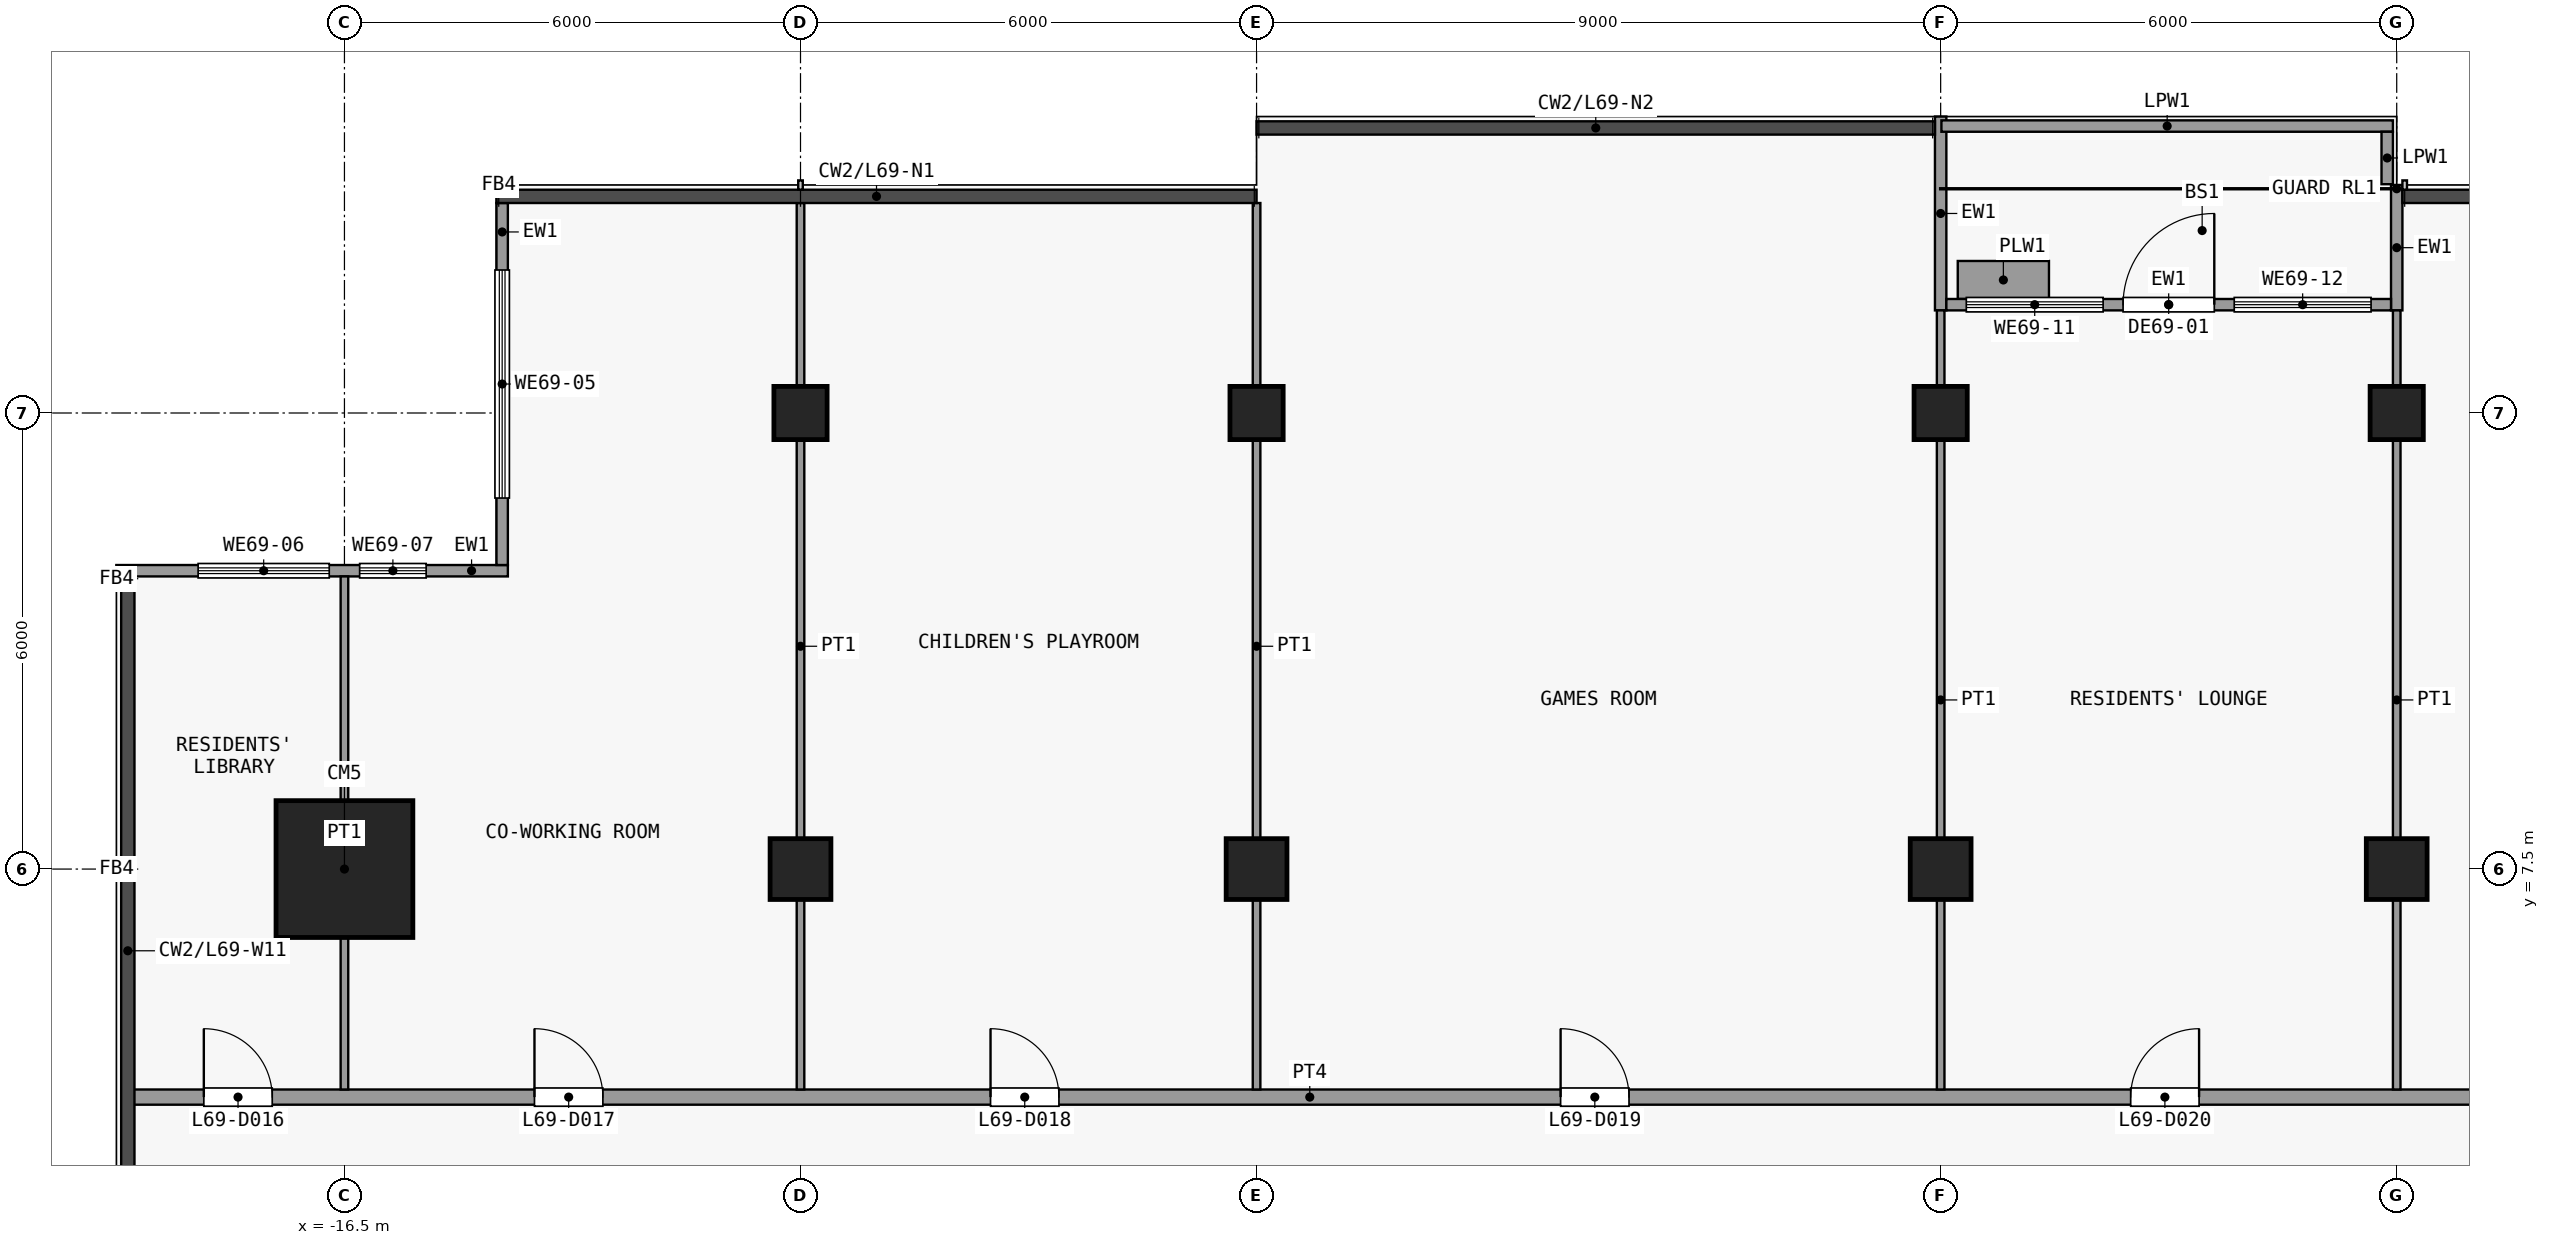
"""IFC4 building model, lengths in metres.
Left out: names, types, materials, properties, quantities, classifications, styles, units other than length and angle.
Written with IfcOpenShell. Run it as: python <this file> out.ifc"""

import sys

from ifc_helpers import new_model, si_unit, direction, frame, frame_2d, origin, origin_2d, place, context, subcontext, project, spatial, rectangle, extrude, element, fill, save


model = new_model("IFC4")
c1 = context("Model", 3, precision=1e-05, world=origin(), true_north=direction((0.0, 1.0)))
c2 = subcontext(c1, "Body", "Model", "MODEL_VIEW")
j1 = project(units=[si_unit("LENGTHUNIT", "METRE"), si_unit("PLANEANGLEUNIT", "RADIAN")], contexts=[c1])
p1 = place(None, origin())
s1 = spatial("IfcSite", under=j1, at=p1, CompositionType="ELEMENT")
p2 = place(p1, origin())
s2 = spatial("IfcBuilding", under=s1, at=p2, CompositionType="ELEMENT")
p3 = place(p2, frame((0.0, 0.0, 273.5)))
s3 = spatial("IfcBuildingStorey", under=s2, at=p3, CompositionType="ELEMENT", Elevation=273.5)
p4 = place(p3, frame((-16.5, 7.5, 0.0), z_axis=(0.0, 0.0, 1.0), x_axis=(1.0, 0.0, 0.0)))
e1 = element("IfcColumn", 1, at=p4, inside=s3, PredefinedType="COLUMN", context=c2, shape_type="SweptSolid", body=[
    extrude(rectangle(XDim=1.8, YDim=1.8, at=origin_2d()), origin(), (0.0, 0.0, 1.0), 3.6),
])
p5 = place(p3, frame((-10.5, 7.5, 0.0), z_axis=(0.0, 0.0, 1.0), x_axis=(1.0, 0.0, 0.0)))
e2 = element("IfcColumn", 2, at=p5, inside=s3, PredefinedType="COLUMN", context=c2, shape_type="SweptSolid", body=[
    extrude(rectangle(XDim=0.8, YDim=0.8, at=origin_2d()), origin(), (0.0, 0.0, 1.0), 3.6),
])
p6 = place(p3, frame((-10.5, 13.5, 0.0), z_axis=(0.0, 0.0, 1.0), x_axis=(1.0, 0.0, 0.0)))
e3 = element("IfcColumn", 3, at=p6, inside=s3, PredefinedType="COLUMN", context=c2, shape_type="SweptSolid", body=[
    extrude(rectangle(XDim=0.7, YDim=0.7, at=origin_2d()), origin(), (0.0, 0.0, 1.0), 3.6),
])
p7 = place(p3, frame((-4.5, 7.5, 0.0), z_axis=(0.0, 0.0, 1.0), x_axis=(1.0, 0.0, 0.0)))
e4 = element("IfcColumn", 4, at=p7, inside=s3, PredefinedType="COLUMN", context=c2, shape_type="SweptSolid", body=[
    extrude(rectangle(XDim=0.8, YDim=0.8, at=origin_2d()), origin(), (0.0, 0.0, 1.0), 3.6),
])
p8 = place(p3, frame((-4.5, 13.5, 0.0), z_axis=(0.0, 0.0, 1.0), x_axis=(1.0, 0.0, 0.0)))
e5 = element("IfcColumn", 5, at=p8, inside=s3, PredefinedType="COLUMN", context=c2, shape_type="SweptSolid", body=[
    extrude(rectangle(XDim=0.7, YDim=0.7, at=origin_2d()), origin(), (0.0, 0.0, 1.0), 3.6),
])
p9 = place(p3, frame((4.5, 7.5, 0.0), z_axis=(0.0, 0.0, 1.0), x_axis=(1.0, 0.0, 0.0)))
e6 = element("IfcColumn", 6, at=p9, inside=s3, PredefinedType="COLUMN", context=c2, shape_type="SweptSolid", body=[
    extrude(rectangle(XDim=0.8, YDim=0.8, at=origin_2d()), origin(), (0.0, 0.0, 1.0), 3.6),
])
p10 = place(p3, frame((4.5, 13.5, 0.0), z_axis=(0.0, 0.0, 1.0), x_axis=(1.0, 0.0, 0.0)))
e7 = element("IfcColumn", 7, at=p10, inside=s3, PredefinedType="COLUMN", context=c2, shape_type="SweptSolid", body=[
    extrude(rectangle(XDim=0.7, YDim=0.7, at=origin_2d()), origin(), (0.0, 0.0, 1.0), 3.6),
])
p11 = place(p3, frame((10.5, 7.5, 0.0), z_axis=(0.0, 0.0, 1.0), x_axis=(1.0, 0.0, 0.0)))
e8 = element("IfcColumn", 8, at=p11, inside=s3, PredefinedType="COLUMN", context=c2, shape_type="SweptSolid", body=[
    extrude(rectangle(XDim=0.8, YDim=0.8, at=origin_2d()), origin(), (0.0, 0.0, 1.0), 3.6),
])
p12 = place(p3, frame((10.5, 13.5, 0.0), z_axis=(0.0, 0.0, 1.0), x_axis=(1.0, 0.0, 0.0)))
e9 = element("IfcColumn", 9, at=p12, inside=s3, PredefinedType="COLUMN", context=c2, shape_type="SweptSolid", body=[
    extrude(rectangle(XDim=0.7, YDim=0.7, at=origin_2d()), origin(), (0.0, 0.0, 1.0), 3.6),
])
p13 = place(p3, frame((-14.425, 11.5, 0.0), z_axis=(0.0, 0.0, 1.0), x_axis=(0.0, 1.0, 0.0)))
e10 = element("IfcWall", 10, at=p13, inside=s3, PredefinedType="SOLIDWALL", context=c2, shape_type="SweptSolid", body=[
    extrude(rectangle(XDim=4.762, YDim=0.15, at=frame_2d((2.381, 0.0))), origin(), (0.0, 0.0, 1.0), 3.3),
])
p14 = place(p13, frame((0.881, 0.0, 0.9)))
e11 = element("IfcOpeningElement", 11, at=p14, cuts=e10, PredefinedType="OPENING", context=c2, shape_type="SweptSolid", body=[
    extrude(rectangle(XDim=3.0, YDim=2.4, at=frame_2d((1.5, 1.2))), frame((0.0, 0.085, 0.0), z_axis=(0.0, -1.0, 0.0), x_axis=(1.0, 0.0, 0.0)), (0.0, 0.0, 1.0), 0.17),
])
p15 = place(p3, frame((-19.5, 11.425, 0.0), z_axis=(0.0, 0.0, 1.0), x_axis=(1.0, 0.0, 0.0)))
e12 = element("IfcWall", 12, at=p15, inside=s3, PredefinedType="SOLIDWALL", context=c2, shape_type="SweptSolid", body=[
    extrude(rectangle(XDim=5.15, YDim=0.15, at=frame_2d((2.575, 0.0))), origin(), (0.0, 0.0, 1.0), 3.3),
])
p16 = place(p15, frame((1.075, 0.0, 0.9)))
e13 = element("IfcOpeningElement", 13, at=p16, cuts=e12, PredefinedType="OPENING", context=c2, shape_type="SweptSolid", body=[
    extrude(rectangle(XDim=1.725, YDim=2.4, at=frame_2d((0.863, 1.2))), frame((0.0, 0.085, 0.0), z_axis=(0.0, -1.0, 0.0), x_axis=(1.0, 0.0, 0.0)), (0.0, 0.0, 1.0), 0.17),
])
p17 = place(p15, frame((3.2, 0.0, 0.9)))
e14 = element("IfcOpeningElement", 14, at=p17, cuts=e12, PredefinedType="OPENING", context=c2, shape_type="SweptSolid", body=[
    extrude(rectangle(XDim=0.875, YDim=2.4, at=frame_2d((0.438, 1.2))), frame((0.0, 0.085, 0.0), z_axis=(0.0, -1.0, 0.0), x_axis=(1.0, 0.0, 0.0)), (0.0, 0.0, 1.0), 0.17),
])
p18 = place(p3, frame((4.5, 14.85, 0.0), z_axis=(0.0, 0.0, 1.0), x_axis=(0.0, 1.0, 0.0)))
e15 = element("IfcWall", 15, at=p18, inside=s3, PredefinedType="SOLIDWALL", context=c2, shape_type="SweptSolid", body=[
    extrude(rectangle(XDim=2.55, YDim=0.15, at=frame_2d((1.275, 0.0))), origin(), (0.0, 0.0, 1.0), 3.3),
])
p19 = place(p3, frame((10.5, 14.85, 0.0), z_axis=(0.0, 0.0, 1.0), x_axis=(0.0, 1.0, 0.0)))
e16 = element("IfcWall", 16, at=p19, inside=s3, PredefinedType="SOLIDWALL", context=c2, shape_type="SweptSolid", body=[
    extrude(rectangle(XDim=1.65, YDim=0.15, at=frame_2d((0.825, 0.0))), origin(), (0.0, 0.0, 1.0), 3.3),
])
p20 = place(p3, frame((4.575, 14.925, 0.0), z_axis=(0.0, 0.0, 1.0), x_axis=(1.0, 0.0, 0.0)))
e17 = element("IfcWall", 17, at=p20, inside=s3, PredefinedType="SOLIDWALL", context=c2, shape_type="SweptSolid", body=[
    extrude(rectangle(XDim=5.85, YDim=0.15, at=frame_2d((2.925, 0.0))), origin(), (0.0, 0.0, 1.0), 3.3),
])
p21 = place(p20, frame((2.325, 0.0, 0.0)))
e18 = element("IfcOpeningElement", 18, at=p21, cuts=e17, PredefinedType="OPENING", context=c2, shape_type="SweptSolid", body=[
    extrude(rectangle(XDim=1.2, YDim=2.4, at=frame_2d((0.6, 1.2))), frame((0.0, 0.085, 0.0), z_axis=(0.0, -1.0, 0.0), x_axis=(1.0, 0.0, 0.0)), (0.0, 0.0, 1.0), 0.17),
])
p22 = place(p20, frame((0.262, 0.0, 0.9)))
e19 = element("IfcOpeningElement", 19, at=p22, cuts=e17, PredefinedType="OPENING", context=c2, shape_type="SweptSolid", body=[
    extrude(rectangle(XDim=1.8, YDim=2.1, at=frame_2d((0.9, 1.05))), frame((0.0, 0.085, 0.0), z_axis=(0.0, -1.0, 0.0), x_axis=(1.0, 0.0, 0.0)), (0.0, 0.0, 1.0), 0.17),
])
p23 = place(p20, frame((3.788, 0.0, 0.9)))
e20 = element("IfcOpeningElement", 20, at=p23, cuts=e17, PredefinedType="OPENING", context=c2, shape_type="SweptSolid", body=[
    extrude(rectangle(XDim=1.8, YDim=2.1, at=frame_2d((0.9, 1.05))), frame((0.0, 0.085, 0.0), z_axis=(0.0, -1.0, 0.0), x_axis=(1.0, 0.0, 0.0)), (0.0, 0.0, 1.0), 0.17),
])
p24 = place(p3, frame((4.725, 15.25, 0.0), z_axis=(0.0, 0.0, 1.0), x_axis=(1.0, 0.0, 0.0)))
e21 = element("IfcWall", 21, at=p24, inside=s3, PredefinedType="USERDEFINED", context=c2, shape_type="SweptSolid", body=[
    extrude(rectangle(XDim=1.2, YDim=0.5, at=frame_2d((0.6, 0.0))), origin(), (0.0, 0.0, 1.0), 0.9),
])
p25 = place(p3, frame((4.51, 17.275, 0.0), z_axis=(0.0, 0.0, 1.0), x_axis=(1.0, 0.0, 0.0)))
e22 = element("IfcWall", 22, at=p25, inside=s3, PredefinedType="PARAPET", context=c2, shape_type="SweptSolid", body=[
    extrude(rectangle(XDim=5.94, YDim=0.15, at=frame_2d((2.97, 0.0))), origin(), (0.0, 0.0, 1.0), 1.15),
])
p26 = place(p3, frame((10.375, 17.2, 0.0), z_axis=(0.0, 0.0, 1.0), x_axis=(0.0, -1.0, 0.0)))
e23 = element("IfcWall", 23, at=p26, inside=s3, PredefinedType="PARAPET", context=c2, shape_type="SweptSolid", body=[
    extrude(rectangle(XDim=0.69, YDim=0.15, at=frame_2d((0.345, 0.0))), origin(), (0.0, 0.0, 1.0), 1.15),
])
p27 = place(p3, frame((-19.35, 4.5, 0.0), z_axis=(0.0, 0.0, 1.0), x_axis=(1.0, 0.0, 0.0)))
e24 = element("IfcWall", 24, at=p27, inside=s3, PredefinedType="PARTITIONING", context=c2, shape_type="SweptSolid", body=[
    extrude(rectangle(XDim=38.7, YDim=0.2, at=frame_2d((19.35, 0.0))), origin(), (0.0, 0.0, 1.0), 3.3),
])
p28 = place(p27, frame((1.0, 0.0, 0.0)))
e25 = element("IfcOpeningElement", 25, at=p28, cuts=e24, PredefinedType="OPENING", context=c2, shape_type="SweptSolid", body=[
    extrude(rectangle(XDim=0.9, YDim=2.1, at=frame_2d((0.45, 1.05))), frame((0.0, 0.11, 0.0), z_axis=(0.0, -1.0, 0.0), x_axis=(1.0, 0.0, 0.0)), (0.0, 0.0, 1.0), 0.22),
])
p29 = place(p27, frame((5.35, 0.0, 0.0)))
e26 = element("IfcOpeningElement", 26, at=p29, cuts=e24, PredefinedType="OPENING", context=c2, shape_type="SweptSolid", body=[
    extrude(rectangle(XDim=0.9, YDim=2.1, at=frame_2d((0.45, 1.05))), frame((0.0, 0.11, 0.0), z_axis=(0.0, -1.0, 0.0), x_axis=(1.0, 0.0, 0.0)), (0.0, 0.0, 1.0), 0.22),
])
p30 = place(p27, frame((11.35, 0.0, 0.0)))
e27 = element("IfcOpeningElement", 27, at=p30, cuts=e24, PredefinedType="OPENING", context=c2, shape_type="SweptSolid", body=[
    extrude(rectangle(XDim=0.9, YDim=2.1, at=frame_2d((0.45, 1.05))), frame((0.0, 0.11, 0.0), z_axis=(0.0, -1.0, 0.0), x_axis=(1.0, 0.0, 0.0)), (0.0, 0.0, 1.0), 0.22),
])
p31 = place(p27, frame((18.85, 0.0, 0.0)))
e28 = element("IfcOpeningElement", 28, at=p31, cuts=e24, PredefinedType="OPENING", context=c2, shape_type="SweptSolid", body=[
    extrude(rectangle(XDim=0.9, YDim=2.1, at=frame_2d((0.45, 1.05))), frame((0.0, 0.11, 0.0), z_axis=(0.0, -1.0, 0.0), x_axis=(1.0, 0.0, 0.0)), (0.0, 0.0, 1.0), 0.22),
])
p32 = place(p27, frame((26.35, 0.0, 0.0)))
e29 = element("IfcOpeningElement", 29, at=p32, cuts=e24, PredefinedType="OPENING", context=c2, shape_type="SweptSolid", body=[
    extrude(rectangle(XDim=0.9, YDim=2.1, at=frame_2d((0.45, 1.05))), frame((0.0, 0.11, 0.0), z_axis=(0.0, -1.0, 0.0), x_axis=(1.0, 0.0, 0.0)), (0.0, 0.0, 1.0), 0.22),
])
p33 = place(p27, frame((32.35, 0.0, 0.0)))
e30 = element("IfcOpeningElement", 30, at=p33, cuts=e24, PredefinedType="OPENING", context=c2, shape_type="SweptSolid", body=[
    extrude(rectangle(XDim=0.9, YDim=2.1, at=frame_2d((0.45, 1.05))), frame((0.0, 0.11, 0.0), z_axis=(0.0, -1.0, 0.0), x_axis=(1.0, 0.0, 0.0)), (0.0, 0.0, 1.0), 0.22),
])
p34 = place(p27, frame((36.85, 0.0, 0.0)))
e31 = element("IfcOpeningElement", 31, at=p34, cuts=e24, PredefinedType="OPENING", context=c2, shape_type="SweptSolid", body=[
    extrude(rectangle(XDim=0.9, YDim=2.1, at=frame_2d((0.45, 1.05))), frame((0.0, 0.11, 0.0), z_axis=(0.0, -1.0, 0.0), x_axis=(1.0, 0.0, 0.0)), (0.0, 0.0, 1.0), 0.22),
])
p35 = place(p3, frame((-16.5, 4.6, 0.0), z_axis=(0.0, 0.0, 1.0), x_axis=(0.0, 1.0, 0.0)))
e32 = element("IfcWall", 32, at=p35, inside=s3, PredefinedType="PARTITIONING", context=c2, shape_type="SweptSolid", body=[
    extrude(rectangle(XDim=6.75, YDim=0.1, at=frame_2d((3.375, 0.0))), origin(), (0.0, 0.0, 1.0), 3.3),
])
for number, where, z_axis, x_axis in (
    (33, (-10.5, 4.6, 0.0), (0.0, 0.0, 1.0), (0.0, 1.0, 0.0)),
    (34, (-4.5, 4.6, 0.0), (0.0, 0.0, 1.0), (0.0, 1.0, 0.0)),
):
    element("IfcWall", number, at=place(p3, frame(where, z_axis=z_axis, x_axis=x_axis)), inside=s3, PredefinedType="PARTITIONING", context=c2, shape_type="SweptSolid", body=[
        extrude(rectangle(XDim=11.662, YDim=0.1, at=frame_2d((5.831, 0.0))), origin(), (0.0, 0.0, 1.0), 3.3),
    ])
for number, where, z_axis, x_axis in (
    (35, (4.5, 4.6, 0.0), (0.0, 0.0, 1.0), (0.0, 1.0, 0.0)),
    (36, (10.5, 4.6, 0.0), (0.0, 0.0, 1.0), (0.0, 1.0, 0.0)),
):
    element("IfcWall", number, at=place(p3, frame(where, z_axis=z_axis, x_axis=x_axis)), inside=s3, PredefinedType="PARTITIONING", context=c2, shape_type="SweptSolid", body=[
        extrude(rectangle(XDim=10.25, YDim=0.1, at=frame_2d((5.125, 0.0))), origin(), (0.0, 0.0, 1.0), 3.3),
    ])
p36 = place(p14, origin())
e37 = element("IfcWindow", 37, at=p36, inside=s3, PartitioningType="SINGLE_PANEL", PredefinedType="WINDOW", context=c2, shape_type="SweptSolid", body=[
    extrude(rectangle(XDim=3.0, YDim=2.4, at=frame_2d((1.5, 1.2))), frame((0.0, 0.03, 0.0), z_axis=(0.0, -1.0, 0.0), x_axis=(1.0, 0.0, 0.0)), (0.0, 0.0, 1.0), 0.06),
])
fill(e11, e37)
p37 = place(p16, origin())
e38 = element("IfcWindow", 38, at=p37, inside=s3, PartitioningType="SINGLE_PANEL", PredefinedType="WINDOW", context=c2, shape_type="SweptSolid", body=[
    extrude(rectangle(XDim=1.725, YDim=2.4, at=frame_2d((0.863, 1.2))), frame((0.0, 0.03, 0.0), z_axis=(0.0, -1.0, 0.0), x_axis=(1.0, 0.0, 0.0)), (0.0, 0.0, 1.0), 0.06),
])
fill(e13, e38)
p38 = place(p17, origin())
e39 = element("IfcWindow", 39, at=p38, inside=s3, PartitioningType="SINGLE_PANEL", PredefinedType="WINDOW", context=c2, shape_type="SweptSolid", body=[
    extrude(rectangle(XDim=0.875, YDim=2.4, at=frame_2d((0.438, 1.2))), frame((0.0, 0.03, 0.0), z_axis=(0.0, -1.0, 0.0), x_axis=(1.0, 0.0, 0.0)), (0.0, 0.0, 1.0), 0.06),
])
fill(e14, e39)
p39 = place(p21, origin())
e40 = element("IfcDoor", 40, at=p39, inside=s3, OperationType="SINGLE_SWING_RIGHT", PredefinedType="DOOR", context=c2, shape_type="SweptSolid", body=[
    extrude(rectangle(XDim=1.2, YDim=2.4, at=frame_2d((0.6, 1.2))), frame((0.0, 0.025, 0.0), z_axis=(0.0, -1.0, 0.0), x_axis=(1.0, 0.0, 0.0)), (0.0, 0.0, 1.0), 0.05),
])
fill(e18, e40)
p40 = place(p22, origin())
e41 = element("IfcWindow", 41, at=p40, inside=s3, PartitioningType="SINGLE_PANEL", PredefinedType="WINDOW", context=c2, shape_type="SweptSolid", body=[
    extrude(rectangle(XDim=1.8, YDim=2.1, at=frame_2d((0.9, 1.05))), frame((0.0, 0.03, 0.0), z_axis=(0.0, -1.0, 0.0), x_axis=(1.0, 0.0, 0.0)), (0.0, 0.0, 1.0), 0.06),
])
fill(e19, e41)
p41 = place(p23, origin())
e42 = element("IfcWindow", 42, at=p41, inside=s3, PartitioningType="SINGLE_PANEL", PredefinedType="WINDOW", context=c2, shape_type="SweptSolid", body=[
    extrude(rectangle(XDim=1.8, YDim=2.1, at=frame_2d((0.9, 1.05))), frame((0.0, 0.03, 0.0), z_axis=(0.0, -1.0, 0.0), x_axis=(1.0, 0.0, 0.0)), (0.0, 0.0, 1.0), 0.06),
])
fill(e20, e42)
p42 = place(p28, origin())
e43 = element("IfcDoor", 43, at=p42, inside=s3, OperationType="SINGLE_SWING_RIGHT", PredefinedType="DOOR", context=c2, shape_type="SweptSolid", body=[
    extrude(rectangle(XDim=0.9, YDim=2.1, at=frame_2d((0.45, 1.05))), frame((0.0, 0.025, 0.0), z_axis=(0.0, -1.0, 0.0), x_axis=(1.0, 0.0, 0.0)), (0.0, 0.0, 1.0), 0.05),
])
fill(e25, e43)
p43 = place(p29, origin())
e44 = element("IfcDoor", 44, at=p43, inside=s3, OperationType="SINGLE_SWING_RIGHT", PredefinedType="DOOR", context=c2, shape_type="SweptSolid", body=[
    extrude(rectangle(XDim=0.9, YDim=2.1, at=frame_2d((0.45, 1.05))), frame((0.0, 0.025, 0.0), z_axis=(0.0, -1.0, 0.0), x_axis=(1.0, 0.0, 0.0)), (0.0, 0.0, 1.0), 0.05),
])
fill(e26, e44)
p44 = place(p30, origin())
e45 = element("IfcDoor", 45, at=p44, inside=s3, OperationType="SINGLE_SWING_RIGHT", PredefinedType="DOOR", context=c2, shape_type="SweptSolid", body=[
    extrude(rectangle(XDim=0.9, YDim=2.1, at=frame_2d((0.45, 1.05))), frame((0.0, 0.025, 0.0), z_axis=(0.0, -1.0, 0.0), x_axis=(1.0, 0.0, 0.0)), (0.0, 0.0, 1.0), 0.05),
])
fill(e27, e45)
p45 = place(p31, origin())
e46 = element("IfcDoor", 46, at=p45, inside=s3, OperationType="SINGLE_SWING_RIGHT", PredefinedType="DOOR", context=c2, shape_type="SweptSolid", body=[
    extrude(rectangle(XDim=0.9, YDim=2.1, at=frame_2d((0.45, 1.05))), frame((0.0, 0.025, 0.0), z_axis=(0.0, -1.0, 0.0), x_axis=(1.0, 0.0, 0.0)), (0.0, 0.0, 1.0), 0.05),
])
fill(e28, e46)
p46 = place(p32, origin())
e47 = element("IfcDoor", 47, at=p46, inside=s3, OperationType="SINGLE_SWING_LEFT", PredefinedType="DOOR", context=c2, shape_type="SweptSolid", body=[
    extrude(rectangle(XDim=0.9, YDim=2.1, at=frame_2d((0.45, 1.05))), frame((0.0, 0.025, 0.0), z_axis=(0.0, -1.0, 0.0), x_axis=(1.0, 0.0, 0.0)), (0.0, 0.0, 1.0), 0.05),
])
fill(e29, e47)
save(model, sys.argv[1])
